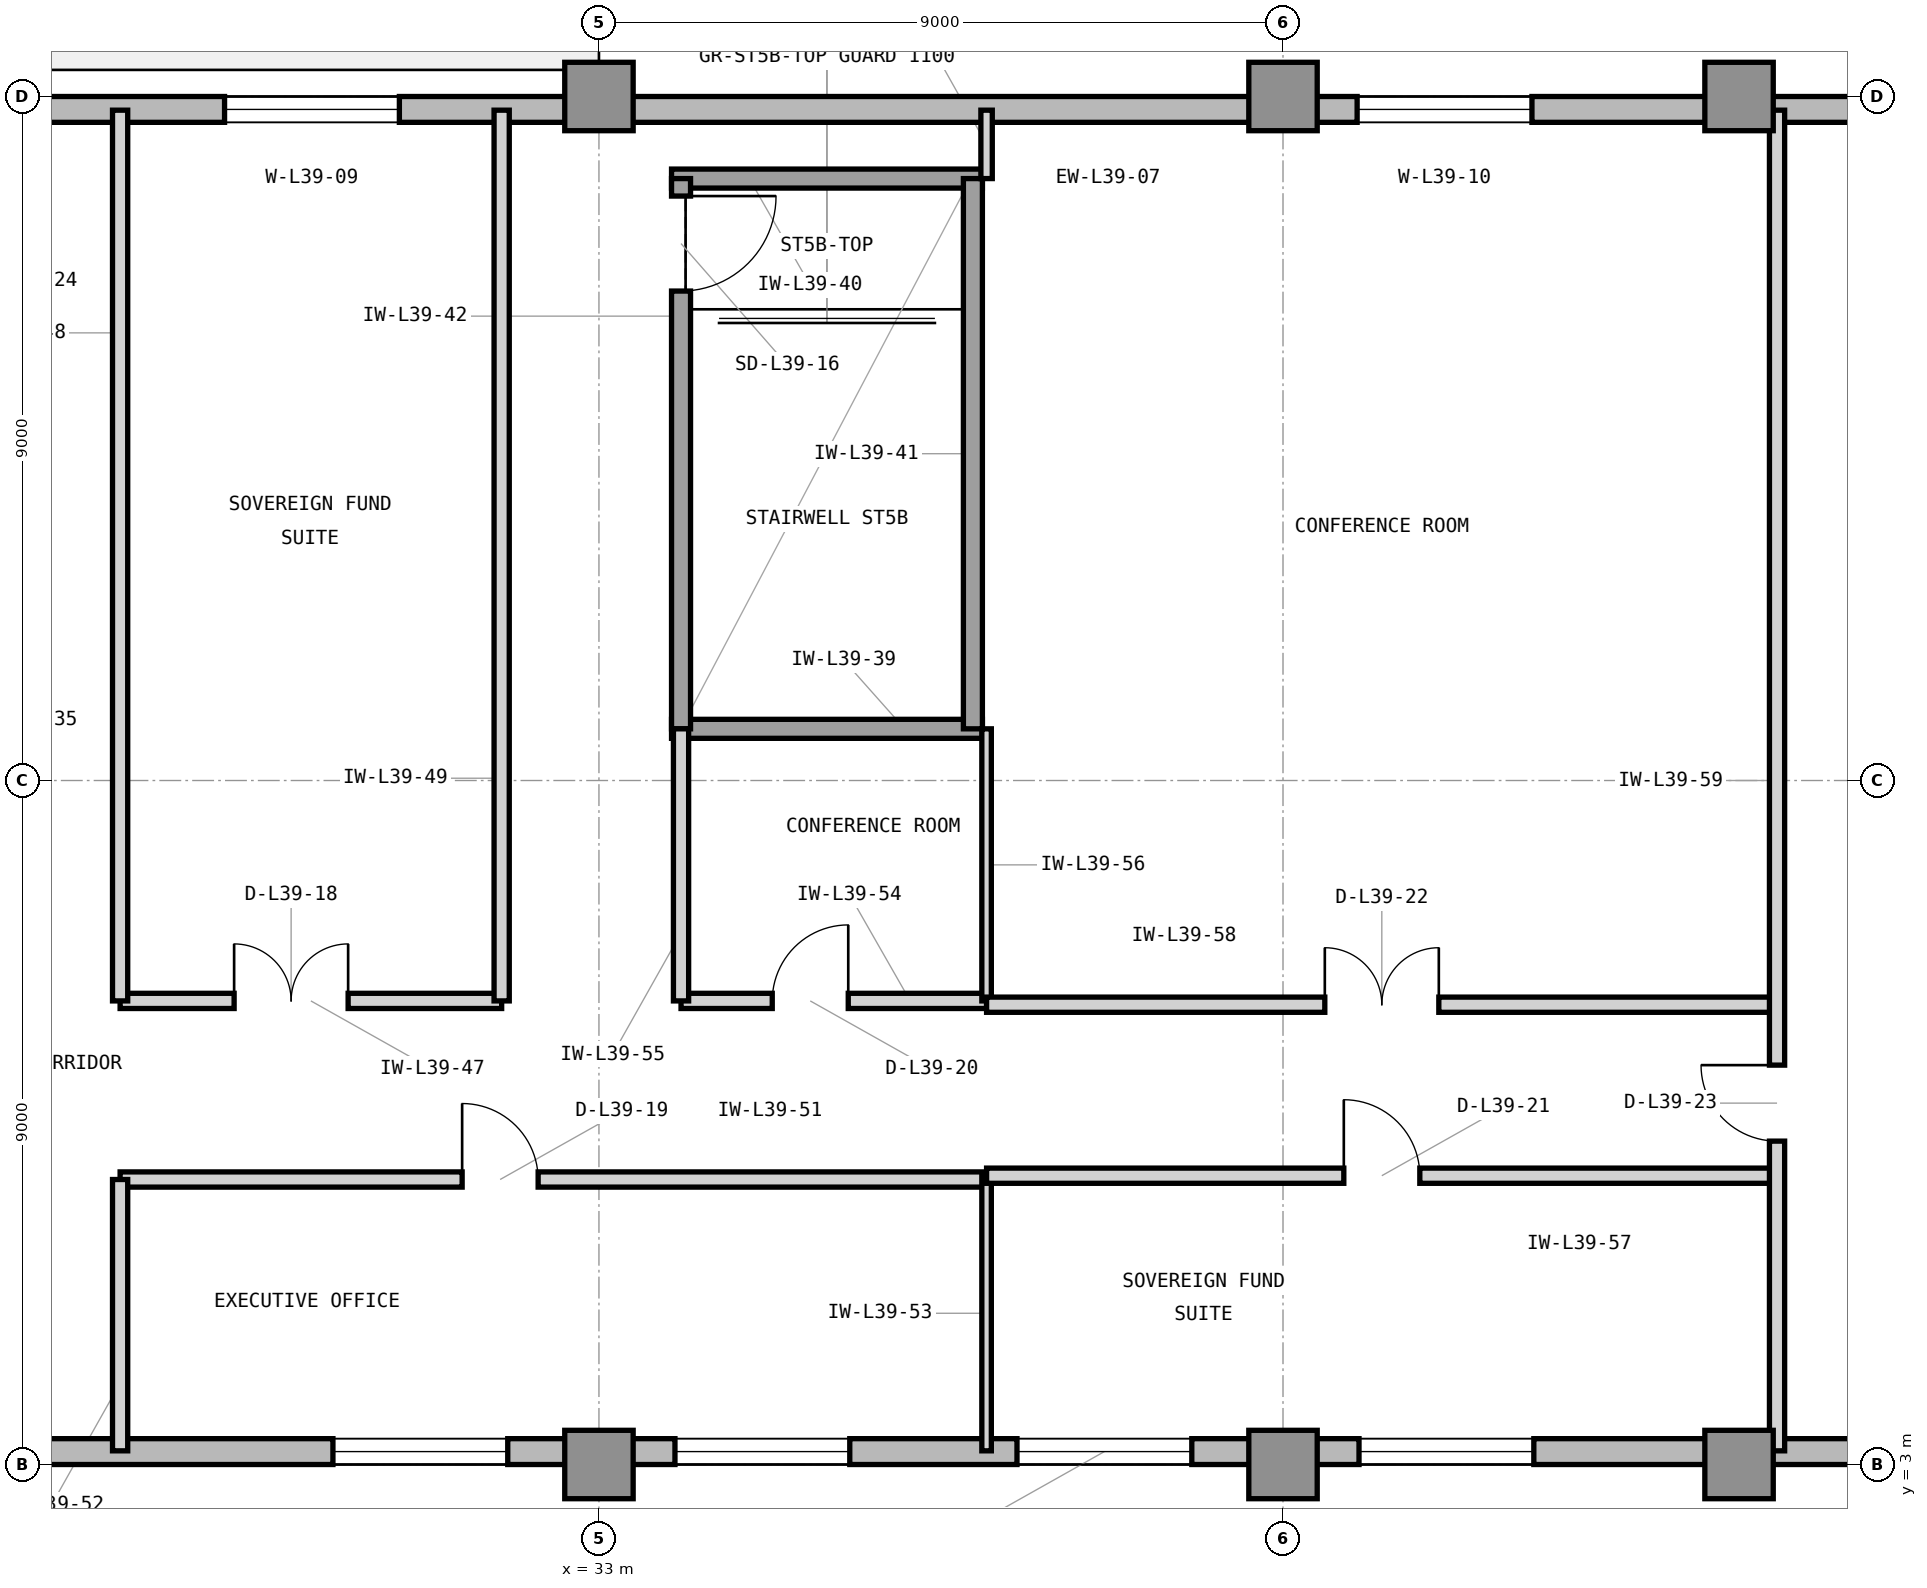
"""IFC4 building model, lengths in metres.
Left out: names, types, materials, properties, quantities, classifications, styles, units other than length and angle.
Written with IfcOpenShell. Run it as: python <this file> out.ifc"""

import sys

from ifc_helpers import new_model, si_unit, direction, frame, frame_2d, origin, origin_2d, place, context, subcontext, project, spatial, rectangle, extrude, element, fill, save


model = new_model("IFC4")
c1 = context("Model", 3, precision=1e-05, world=origin(), true_north=direction((0.0, 1.0)))
c2 = subcontext(c1, "Body", "Model", "MODEL_VIEW")
j1 = project(units=[si_unit("LENGTHUNIT", "METRE"), si_unit("PLANEANGLEUNIT", "RADIAN")], contexts=[c1])
p1 = place(None, origin())
s1 = spatial("IfcSite", under=j1, at=p1, CompositionType="ELEMENT")
p2 = place(p1, origin())
s2 = spatial("IfcBuilding", under=s1, at=p2, CompositionType="ELEMENT")
p3 = place(p2, frame((0.0, 0.0, 164.4)))
s3 = spatial("IfcBuildingStorey", under=s2, at=p3, CompositionType="ELEMENT", Elevation=164.4)
for number, where, z_axis, x_axis in (
    (1, (33.0, 3.0, 0.0), (0.0, 0.0, 1.0), (1.0, 0.0, 0.0)),
    (2, (33.0, 21.0, 0.0), (0.0, 0.0, 1.0), (1.0, 0.0, 0.0)),
    (3, (42.0, 3.0, 0.0), (0.0, 0.0, 1.0), (1.0, 0.0, 0.0)),
    (4, (42.0, 21.0, 0.0), (0.0, 0.0, 1.0), (1.0, 0.0, 0.0)),
    (5, (48.0, 3.0, 0.0), (0.0, 0.0, 1.0), (1.0, 0.0, 0.0)),
    (6, (48.0, 21.0, 0.0), (0.0, 0.0, 1.0), (1.0, 0.0, 0.0)),
):
    element("IfcColumn", number, at=place(p3, frame(where, z_axis=z_axis, x_axis=x_axis)), inside=s3, PredefinedType="COLUMN", context=c2, shape_type="SweptSolid", body=[
        extrude(rectangle(XDim=0.9, YDim=0.9, at=origin_2d()), origin(), (0.0, 0.0, 1.0), 3.9),
    ])
p4 = place(p3, frame((23.9, 3.17, 0.0), z_axis=(0.0, 0.0, 1.0), x_axis=(1.0, 0.0, 0.0)))
e7 = element("IfcWall", 7, at=p4, inside=s3, PredefinedType="STANDARD", context=c2, shape_type="SweptSolid", body=[
    extrude(rectangle(XDim=31.5, YDim=0.34, at=frame_2d((15.75, 0.0))), origin(), (0.0, 0.0, 1.0), 3.7),
])
p5 = place(p4, frame((5.6, 0.0, 0.9)))
e8 = element("IfcOpeningElement", 8, at=p5, cuts=e7, PredefinedType="OPENING", context=c2, shape_type="SweptSolid", body=[
    extrude(rectangle(XDim=2.3, YDim=2.2, at=frame_2d((1.15, 1.1))), frame((0.0, 0.18, 0.0), z_axis=(0.0, -1.0, 0.0), x_axis=(1.0, 0.0, 0.0)), (0.0, 0.0, 1.0), 0.36),
])
p6 = place(p4, frame((10.1, 0.0, 0.9)))
e9 = element("IfcOpeningElement", 9, at=p6, cuts=e7, PredefinedType="OPENING", context=c2, shape_type="SweptSolid", body=[
    extrude(rectangle(XDim=2.3, YDim=2.2, at=frame_2d((1.15, 1.1))), frame((0.0, 0.18, 0.0), z_axis=(0.0, -1.0, 0.0), x_axis=(1.0, 0.0, 0.0)), (0.0, 0.0, 1.0), 0.36),
])
p7 = place(p4, frame((14.6, 0.0, 0.9)))
e10 = element("IfcOpeningElement", 10, at=p7, cuts=e7, PredefinedType="OPENING", context=c2, shape_type="SweptSolid", body=[
    extrude(rectangle(XDim=2.3, YDim=2.2, at=frame_2d((1.15, 1.1))), frame((0.0, 0.18, 0.0), z_axis=(0.0, -1.0, 0.0), x_axis=(1.0, 0.0, 0.0)), (0.0, 0.0, 1.0), 0.36),
])
p8 = place(p4, frame((19.1, 0.0, 0.9)))
e11 = element("IfcOpeningElement", 11, at=p8, cuts=e7, PredefinedType="OPENING", context=c2, shape_type="SweptSolid", body=[
    extrude(rectangle(XDim=2.3, YDim=2.2, at=frame_2d((1.15, 1.1))), frame((0.0, 0.18, 0.0), z_axis=(0.0, -1.0, 0.0), x_axis=(1.0, 0.0, 0.0)), (0.0, 0.0, 1.0), 0.36),
])
p9 = place(p3, frame((55.4, 20.83, 0.0), z_axis=(0.0, 0.0, 1.0), x_axis=(-1.0, 0.0, 0.0)))
e12 = element("IfcWall", 12, at=p9, inside=s3, PredefinedType="STANDARD", context=c2, shape_type="SweptSolid", body=[
    extrude(rectangle(XDim=31.4, YDim=0.34, at=frame_2d((15.7, 0.0))), origin(), (0.0, 0.0, 1.0), 3.7),
])
p10 = place(p9, frame((25.026, 0.0, 0.9)))
e13 = element("IfcOpeningElement", 13, at=p10, cuts=e12, PredefinedType="OPENING", context=c2, shape_type="SweptSolid", body=[
    extrude(rectangle(XDim=2.3, YDim=2.2, at=frame_2d((1.15, 1.1))), frame((0.0, 0.18, 0.0), z_axis=(0.0, -1.0, 0.0), x_axis=(1.0, 0.0, 0.0)), (0.0, 0.0, 1.0), 0.36),
])
p11 = place(p9, frame((10.125, 0.0, 0.9)))
e14 = element("IfcOpeningElement", 14, at=p11, cuts=e12, PredefinedType="OPENING", context=c2, shape_type="SweptSolid", body=[
    extrude(rectangle(XDim=2.3, YDim=2.2, at=frame_2d((1.15, 1.1))), frame((0.0, 0.18, 0.0), z_axis=(0.0, -1.0, 0.0), x_axis=(1.0, 0.0, 0.0)), (0.0, 0.0, 1.0), 0.36),
])
for number, where, z_axis, x_axis in (
    (15, (33.955, 12.68, 0.0), (0.0, 0.0, 1.0), (1.0, 0.0, 0.0)),
    (16, (33.955, 19.92, 0.0), (0.0, 0.0, 1.0), (1.0, 0.0, 0.0)),
):
    element("IfcWall", number, at=place(p3, frame(where, z_axis=z_axis, x_axis=x_axis)), inside=s3, PredefinedType="SHEAR", context=c2, shape_type="SweptSolid", body=[
        extrude(rectangle(XDim=4.09, YDim=0.25, at=frame_2d((2.045, 0.0))), origin(), (0.0, 0.0, 1.0), 3.9),
    ])
p12 = place(p3, frame((37.92, 12.68, 0.0), z_axis=(0.0, 0.0, 1.0), x_axis=(0.0, 1.0, 0.0)))
e17 = element("IfcWall", 17, at=p12, inside=s3, PredefinedType="SHEAR", context=c2, shape_type="SweptSolid", body=[
    extrude(rectangle(XDim=7.24, YDim=0.25, at=frame_2d((3.62, 0.0))), origin(), (0.0, 0.0, 1.0), 3.9),
])
p13 = place(p3, frame((34.08, 12.68, 0.0), z_axis=(0.0, 0.0, 1.0), x_axis=(0.0, 1.0, 0.0)))
e18 = element("IfcWall", 18, at=p13, inside=s3, PredefinedType="SHEAR", context=c2, shape_type="SweptSolid", body=[
    extrude(rectangle(XDim=7.24, YDim=0.25, at=frame_2d((3.62, 0.0))), origin(), (0.0, 0.0, 1.0), 3.9),
])
p14 = place(p13, frame((5.76, 0.0, 0.0)))
e19 = element("IfcOpeningElement", 19, at=p14, cuts=e18, PredefinedType="OPENING", context=c2, shape_type="SweptSolid", body=[
    extrude(rectangle(XDim=1.25, YDim=2.2, at=frame_2d((0.625, 1.1))), frame((0.0, 0.135, 0.0), z_axis=(0.0, -1.0, 0.0), x_axis=(1.0, 0.0, 0.0)), (0.0, 0.0, 1.0), 0.27),
])
p15 = place(p3, frame((26.7, 9.1, 0.0), z_axis=(0.0, 0.0, 1.0), x_axis=(1.0, 0.0, 0.0)))
e20 = element("IfcWall", 20, at=p15, inside=s3, PredefinedType="PARTITIONING", context=c2, shape_type="SweptSolid", body=[
    extrude(rectangle(XDim=5.02, YDim=0.2, at=frame_2d((2.51, 0.0))), origin(), (0.0, 0.0, 1.0), 3.69),
])
p16 = place(p15, frame((1.5, 0.0, 0.0)))
e21 = element("IfcOpeningElement", 21, at=p16, cuts=e20, PredefinedType="OPENING", context=c2, shape_type="SweptSolid", body=[
    extrude(rectangle(XDim=1.5, YDim=2.3, at=frame_2d((0.75, 1.15))), frame((0.0, 0.11, 0.0), z_axis=(0.0, -1.0, 0.0), x_axis=(1.0, 0.0, 0.0)), (0.0, 0.0, 1.0), 0.22),
])
for number, where, z_axis, x_axis in (
    (22, (26.7, 9.1, 0.0), (0.0, 0.0, 1.0), (0.0, 1.0, 0.0)),
    (23, (31.72, 9.1, 0.0), (0.0, 0.0, 1.0), (0.0, 1.0, 0.0)),
):
    element("IfcWall", number, at=place(p3, frame(where, z_axis=z_axis, x_axis=x_axis)), inside=s3, PredefinedType="PARTITIONING", context=c2, shape_type="SweptSolid", body=[
        extrude(rectangle(XDim=11.72, YDim=0.2, at=frame_2d((5.86, 0.0))), origin(), (0.0, 0.0, 1.0), 3.69),
    ])
p17 = place(p3, frame((38.1, 19.92, 0.0), z_axis=(0.0, 0.0, 1.0), x_axis=(0.0, 1.0, 0.0)))
e24 = element("IfcWall", 24, at=p17, inside=s3, PredefinedType="PARTITIONING", context=c2, shape_type="SweptSolid", body=[
    extrude(rectangle(XDim=0.9, YDim=0.15, at=frame_2d((0.45, 0.0))), origin(), (0.0, 0.0, 1.0), 3.69),
])
p18 = place(p3, frame((26.7, 6.75, 0.0), z_axis=(0.0, 0.0, 1.0), x_axis=(1.0, 0.0, 0.0)))
e25 = element("IfcWall", 25, at=p18, inside=s3, PredefinedType="PARTITIONING", context=c2, shape_type="SweptSolid", body=[
    extrude(rectangle(XDim=11.4, YDim=0.2, at=frame_2d((5.7, 0.0))), origin(), (0.0, 0.0, 1.0), 3.69),
])
p19 = place(p18, frame((4.5, 0.0, 0.0)))
e26 = element("IfcOpeningElement", 26, at=p19, cuts=e25, PredefinedType="OPENING", context=c2, shape_type="SweptSolid", body=[
    extrude(rectangle(XDim=1.0, YDim=2.15, at=frame_2d((0.5, 1.075))), frame((0.0, 0.11, 0.0), z_axis=(0.0, -1.0, 0.0), x_axis=(1.0, 0.0, 0.0)), (0.0, 0.0, 1.0), 0.22),
])
p20 = place(p3, frame((26.7, 3.18, 0.0), z_axis=(0.0, 0.0, 1.0), x_axis=(0.0, 1.0, 0.0)))
e27 = element("IfcWall", 27, at=p20, inside=s3, PredefinedType="PARTITIONING", context=c2, shape_type="SweptSolid", body=[
    extrude(rectangle(XDim=3.57, YDim=0.2, at=frame_2d((1.785, 0.0))), origin(), (0.0, 0.0, 1.0), 3.69),
])
p21 = place(p3, frame((38.1, 3.18, 0.0), z_axis=(0.0, 0.0, 1.0), x_axis=(0.0, 1.0, 0.0)))
e28 = element("IfcWall", 28, at=p21, inside=s3, PredefinedType="PARTITIONING", context=c2, shape_type="SweptSolid", body=[
    extrude(rectangle(XDim=3.62, YDim=0.125, at=frame_2d((1.81, 0.0))), origin(), (0.0, 0.0, 1.0), 3.69),
])
p22 = place(p3, frame((34.08, 9.1, 0.0), z_axis=(0.0, 0.0, 1.0), x_axis=(1.0, 0.0, 0.0)))
e29 = element("IfcWall", 29, at=p22, inside=s3, PredefinedType="PARTITIONING", context=c2, shape_type="SweptSolid", body=[
    extrude(rectangle(XDim=4.02, YDim=0.2, at=frame_2d((2.01, 0.0))), origin(), (0.0, 0.0, 1.0), 3.69),
])
p23 = place(p22, frame((1.2, 0.0, 0.0)))
e30 = element("IfcOpeningElement", 30, at=p23, cuts=e29, PredefinedType="OPENING", context=c2, shape_type="SweptSolid", body=[
    extrude(rectangle(XDim=1.0, YDim=2.15, at=frame_2d((0.5, 1.075))), frame((0.0, 0.11, 0.0), z_axis=(0.0, -1.0, 0.0), x_axis=(1.0, 0.0, 0.0)), (0.0, 0.0, 1.0), 0.22),
])
p24 = place(p3, frame((34.08, 9.1, 0.0), z_axis=(0.0, 0.0, 1.0), x_axis=(0.0, 1.0, 0.0)))
e31 = element("IfcWall", 31, at=p24, inside=s3, PredefinedType="PARTITIONING", context=c2, shape_type="SweptSolid", body=[
    extrude(rectangle(XDim=3.58, YDim=0.2, at=frame_2d((1.79, 0.0))), origin(), (0.0, 0.0, 1.0), 3.69),
])
p25 = place(p3, frame((38.1, 9.1, 0.0), z_axis=(0.0, 0.0, 1.0), x_axis=(0.0, 1.0, 0.0)))
e32 = element("IfcWall", 32, at=p25, inside=s3, PredefinedType="PARTITIONING", context=c2, shape_type="SweptSolid", body=[
    extrude(rectangle(XDim=3.58, YDim=0.125, at=frame_2d((1.79, 0.0))), origin(), (0.0, 0.0, 1.0), 3.69),
])
p26 = place(p3, frame((38.1, 6.8, 0.0), z_axis=(0.0, 0.0, 1.0), x_axis=(1.0, 0.0, 0.0)))
e33 = element("IfcWall", 33, at=p26, inside=s3, PredefinedType="PARTITIONING", context=c2, shape_type="SweptSolid", body=[
    extrude(rectangle(XDim=10.4, YDim=0.2, at=frame_2d((5.2, 0.0))), origin(), (0.0, 0.0, 1.0), 3.69),
])
p27 = place(p26, frame((4.7, 0.0, 0.0)))
e34 = element("IfcOpeningElement", 34, at=p27, cuts=e33, PredefinedType="OPENING", context=c2, shape_type="SweptSolid", body=[
    extrude(rectangle(XDim=1.0, YDim=2.15, at=frame_2d((0.5, 1.075))), frame((0.0, 0.11, 0.0), z_axis=(0.0, -1.0, 0.0), x_axis=(1.0, 0.0, 0.0)), (0.0, 0.0, 1.0), 0.22),
])
p28 = place(p3, frame((38.1, 9.05, 0.0), z_axis=(0.0, 0.0, 1.0), x_axis=(1.0, 0.0, 0.0)))
e35 = element("IfcWall", 35, at=p28, inside=s3, PredefinedType="PARTITIONING", context=c2, shape_type="SweptSolid", body=[
    extrude(rectangle(XDim=10.4, YDim=0.2, at=frame_2d((5.2, 0.0))), origin(), (0.0, 0.0, 1.0), 3.283),
])
p29 = place(p28, frame((4.45, 0.0, 0.0)))
e36 = element("IfcOpeningElement", 36, at=p29, cuts=e35, PredefinedType="OPENING", context=c2, shape_type="SweptSolid", body=[
    extrude(rectangle(XDim=1.5, YDim=2.3, at=frame_2d((0.75, 1.15))), frame((0.0, 0.11, 0.0), z_axis=(0.0, -1.0, 0.0), x_axis=(1.0, 0.0, 0.0)), (0.0, 0.0, 1.0), 0.22),
])
p30 = place(p3, frame((48.5, 3.18, 0.0), z_axis=(0.0, 0.0, 1.0), x_axis=(0.0, 1.0, 0.0)))
e37 = element("IfcWall", 37, at=p30, inside=s3, PredefinedType="PARTITIONING", context=c2, shape_type="SweptSolid", body=[
    extrude(rectangle(XDim=17.64, YDim=0.2, at=frame_2d((8.82, 0.0))), origin(), (0.0, 0.0, 1.0), 3.69),
])
p31 = place(p30, frame((4.075, 0.0, 0.0)))
e38 = element("IfcOpeningElement", 38, at=p31, cuts=e37, PredefinedType="OPENING", context=c2, shape_type="SweptSolid", body=[
    extrude(rectangle(XDim=1.0, YDim=2.15, at=frame_2d((0.5, 1.075))), frame((0.0, 0.11, 0.0), z_axis=(0.0, -1.0, 0.0), x_axis=(1.0, 0.0, 0.0)), (0.0, 0.0, 1.0), 0.22),
])
p32 = place(p5, origin())
e39 = element("IfcWindow", 39, at=p32, inside=s3, PartitioningType="SINGLE_PANEL", PredefinedType="WINDOW", context=c2, shape_type="SweptSolid", body=[
    extrude(rectangle(XDim=2.3, YDim=2.2, at=frame_2d((1.15, 1.1))), frame((0.0, 0.11, 0.0), z_axis=(0.0, -1.0, 0.0), x_axis=(1.0, 0.0, 0.0)), (0.0, 0.0, 1.0), 0.06),
])
fill(e8, e39)
p33 = place(p6, origin())
e40 = element("IfcWindow", 40, at=p33, inside=s3, PartitioningType="SINGLE_PANEL", PredefinedType="WINDOW", context=c2, shape_type="SweptSolid", body=[
    extrude(rectangle(XDim=2.3, YDim=2.2, at=frame_2d((1.15, 1.1))), frame((0.0, 0.11, 0.0), z_axis=(0.0, -1.0, 0.0), x_axis=(1.0, 0.0, 0.0)), (0.0, 0.0, 1.0), 0.06),
])
fill(e9, e40)
p34 = place(p7, origin())
e41 = element("IfcWindow", 41, at=p34, inside=s3, PartitioningType="SINGLE_PANEL", PredefinedType="WINDOW", context=c2, shape_type="SweptSolid", body=[
    extrude(rectangle(XDim=2.3, YDim=2.2, at=frame_2d((1.15, 1.1))), frame((0.0, 0.11, 0.0), z_axis=(0.0, -1.0, 0.0), x_axis=(1.0, 0.0, 0.0)), (0.0, 0.0, 1.0), 0.06),
])
fill(e10, e41)
p35 = place(p8, origin())
e42 = element("IfcWindow", 42, at=p35, inside=s3, PartitioningType="SINGLE_PANEL", PredefinedType="WINDOW", context=c2, shape_type="SweptSolid", body=[
    extrude(rectangle(XDim=2.3, YDim=2.2, at=frame_2d((1.15, 1.1))), frame((0.0, 0.11, 0.0), z_axis=(0.0, -1.0, 0.0), x_axis=(1.0, 0.0, 0.0)), (0.0, 0.0, 1.0), 0.06),
])
fill(e11, e42)
p36 = place(p14, frame((1.25, 0.0, 0.0), z_axis=(0.0, 0.0, 1.0), x_axis=(-1.0, 0.0, 0.0)))
e43 = element("IfcDoor", 43, at=p36, inside=s3, OperationType="SINGLE_SWING_LEFT", PredefinedType="DOOR", context=c2, shape_type="SweptSolid", body=[
    extrude(rectangle(XDim=1.25, YDim=2.2, at=frame_2d((0.625, 1.1))), frame((0.0, 0.025, 0.0), z_axis=(0.0, -1.0, 0.0), x_axis=(1.0, 0.0, 0.0)), (0.0, 0.0, 1.0), 0.05),
])
fill(e19, e43)
p37 = place(p16, origin())
e44 = element("IfcDoor", 44, at=p37, inside=s3, OperationType="DOUBLE_DOOR_SINGLE_SWING", PredefinedType="DOOR", context=c2, shape_type="SweptSolid", body=[
    extrude(rectangle(XDim=1.5, YDim=2.3, at=frame_2d((0.75, 1.15))), frame((0.0, 0.025, 0.0), z_axis=(0.0, -1.0, 0.0), x_axis=(1.0, 0.0, 0.0)), (0.0, 0.0, 1.0), 0.05),
])
fill(e21, e44)
p38 = place(p19, origin())
e45 = element("IfcDoor", 45, at=p38, inside=s3, OperationType="SINGLE_SWING_LEFT", PredefinedType="DOOR", context=c2, shape_type="SweptSolid", body=[
    extrude(rectangle(XDim=1.0, YDim=2.15, at=frame_2d((0.5, 1.075))), frame((0.0, 0.025, 0.0), z_axis=(0.0, -1.0, 0.0), x_axis=(1.0, 0.0, 0.0)), (0.0, 0.0, 1.0), 0.05),
])
fill(e26, e45)
p39 = place(p23, origin())
e46 = element("IfcDoor", 46, at=p39, inside=s3, OperationType="SINGLE_SWING_RIGHT", PredefinedType="DOOR", context=c2, shape_type="SweptSolid", body=[
    extrude(rectangle(XDim=1.0, YDim=2.15, at=frame_2d((0.5, 1.075))), frame((0.0, 0.025, 0.0), z_axis=(0.0, -1.0, 0.0), x_axis=(1.0, 0.0, 0.0)), (0.0, 0.0, 1.0), 0.05),
])
fill(e30, e46)
p40 = place(p27, origin())
e47 = element("IfcDoor", 47, at=p40, inside=s3, OperationType="SINGLE_SWING_LEFT", PredefinedType="DOOR", context=c2, shape_type="SweptSolid", body=[
    extrude(rectangle(XDim=1.0, YDim=2.15, at=frame_2d((0.5, 1.075))), frame((0.0, 0.025, 0.0), z_axis=(0.0, -1.0, 0.0), x_axis=(1.0, 0.0, 0.0)), (0.0, 0.0, 1.0), 0.05),
])
fill(e34, e47)
p41 = place(p29, origin())
e48 = element("IfcDoor", 48, at=p41, inside=s3, OperationType="DOUBLE_DOOR_SINGLE_SWING", PredefinedType="DOOR", context=c2, shape_type="SweptSolid", body=[
    extrude(rectangle(XDim=1.5, YDim=2.3, at=frame_2d((0.75, 1.15))), frame((0.0, 0.025, 0.0), z_axis=(0.0, -1.0, 0.0), x_axis=(1.0, 0.0, 0.0)), (0.0, 0.0, 1.0), 0.05),
])
fill(e36, e48)
p42 = place(p31, origin())
e49 = element("IfcDoor", 49, at=p42, inside=s3, OperationType="SINGLE_SWING_RIGHT", PredefinedType="DOOR", context=c2, shape_type="SweptSolid", body=[
    extrude(rectangle(XDim=1.0, YDim=2.15, at=frame_2d((0.5, 1.075))), frame((0.0, 0.025, 0.0), z_axis=(0.0, -1.0, 0.0), x_axis=(1.0, 0.0, 0.0)), (0.0, 0.0, 1.0), 0.05),
])
fill(e38, e49)
p43 = place(p10, origin())
e50 = element("IfcWindow", 50, at=p43, inside=s3, PartitioningType="SINGLE_PANEL", PredefinedType="WINDOW", context=c2, shape_type="SweptSolid", body=[
    extrude(rectangle(XDim=2.3, YDim=2.2, at=frame_2d((1.15, 1.1))), frame((0.0, 0.11, 0.0), z_axis=(0.0, -1.0, 0.0), x_axis=(1.0, 0.0, 0.0)), (0.0, 0.0, 1.0), 0.06),
])
fill(e13, e50)
p44 = place(p11, origin())
e51 = element("IfcWindow", 51, at=p44, inside=s3, PartitioningType="SINGLE_PANEL", PredefinedType="WINDOW", context=c2, shape_type="SweptSolid", body=[
    extrude(rectangle(XDim=2.3, YDim=2.2, at=frame_2d((1.15, 1.1))), frame((0.0, 0.11, 0.0), z_axis=(0.0, -1.0, 0.0), x_axis=(1.0, 0.0, 0.0)), (0.0, 0.0, 1.0), 0.06),
])
fill(e14, e51)
save(model, sys.argv[1])
